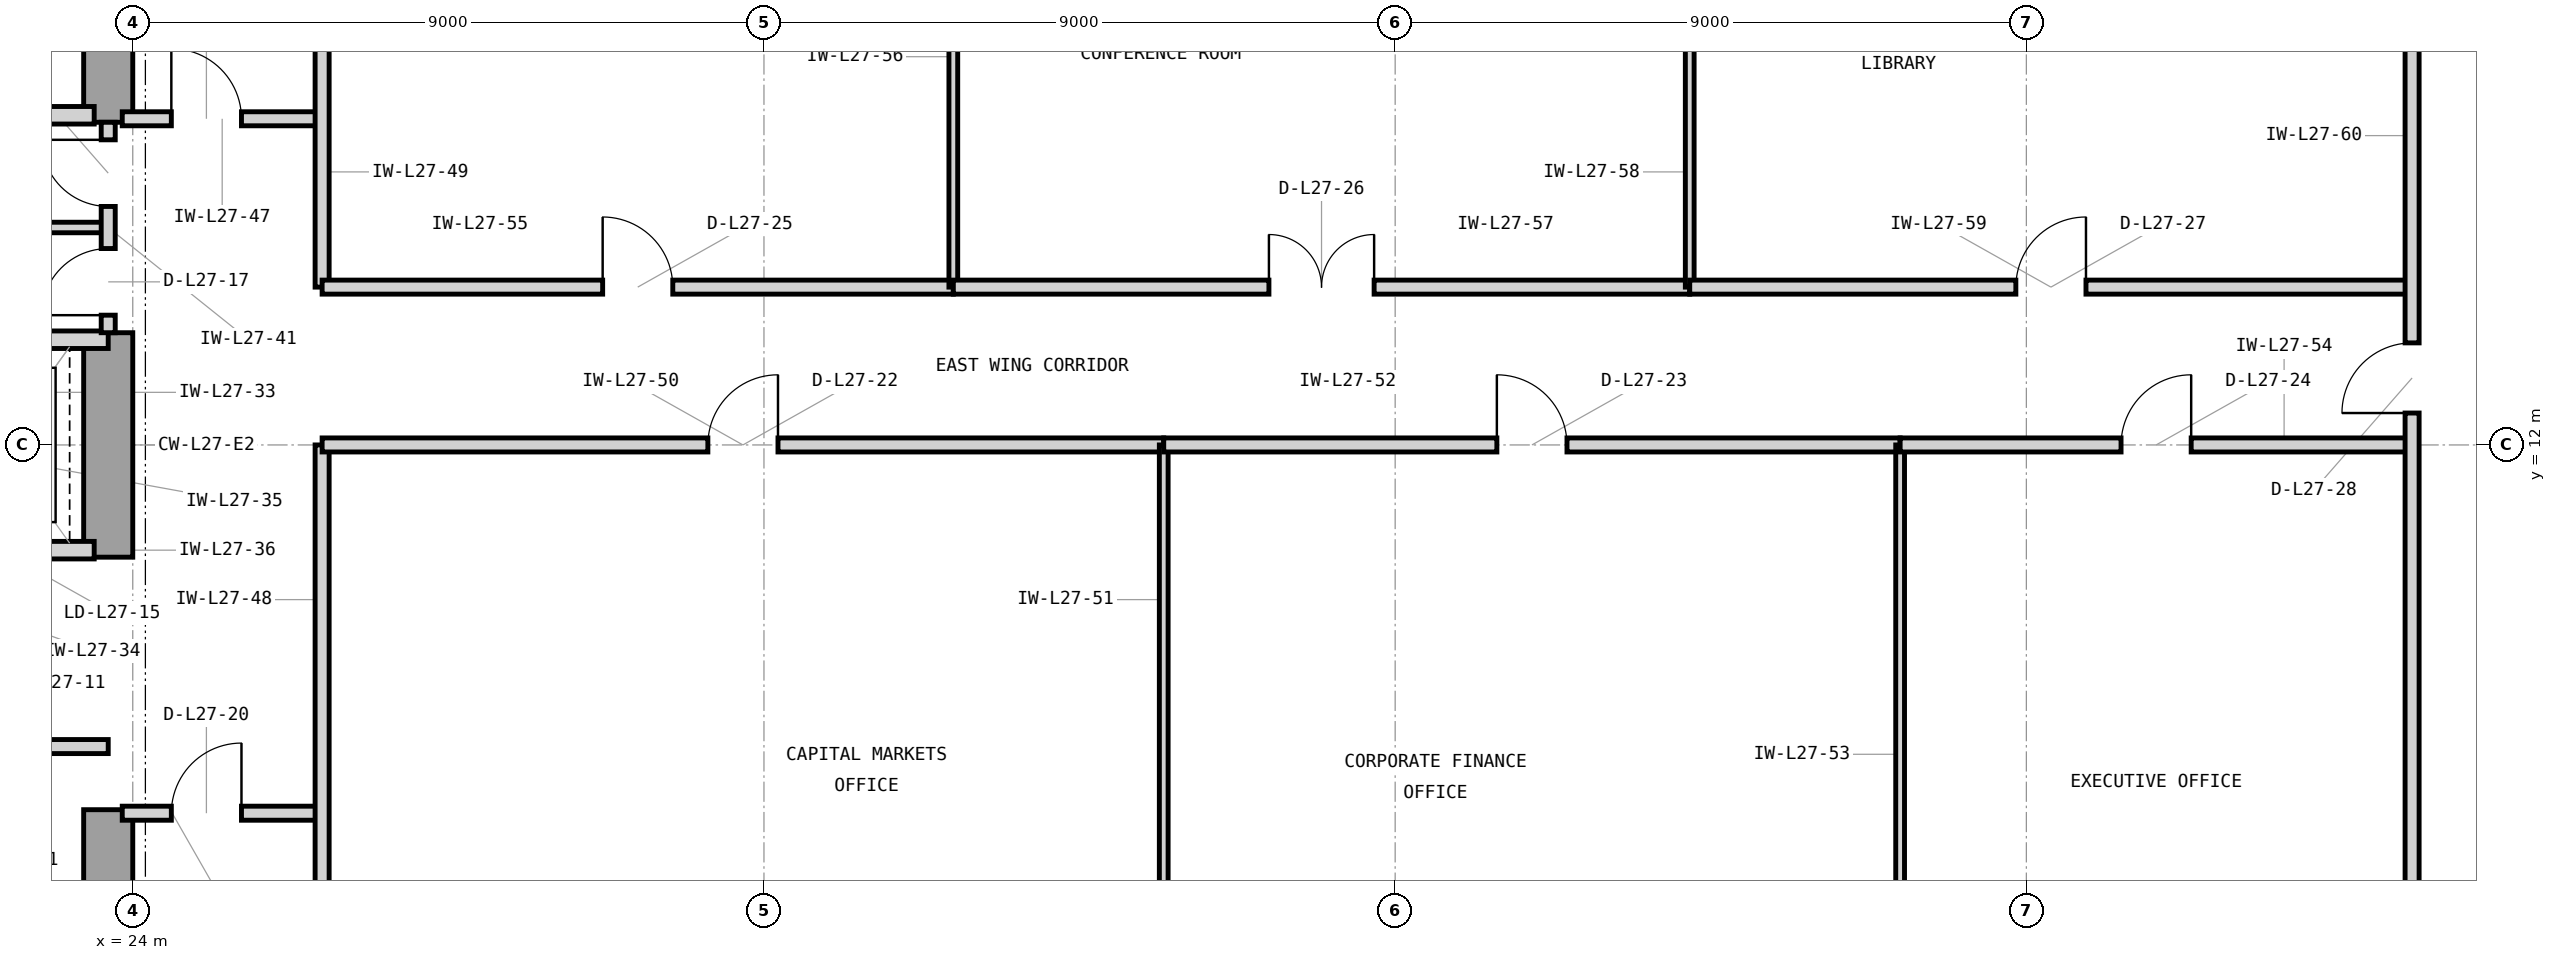
"""IFC4 building model, lengths in metres.
Left out: names, types, materials, properties, quantities, classifications, styles, units other than length and angle.
Written with IfcOpenShell. Run it as: python <this file> out.ifc"""

import sys

from ifc_helpers import new_model, si_unit, direction, frame, frame_2d, origin, place, context, subcontext, project, spatial, rectangle, extrude, element, fill, save


model = new_model("IFC4")
c1 = context("Model", 3, precision=1e-05, world=origin(), true_north=direction((0.0, 1.0)))
c2 = subcontext(c1, "Body", "Model", "MODEL_VIEW")
j1 = project(units=[si_unit("LENGTHUNIT", "METRE"), si_unit("PLANEANGLEUNIT", "RADIAN")], contexts=[c1])
p1 = place(None, origin())
s1 = spatial("IfcSite", under=j1, at=p1, CompositionType="ELEMENT")
p2 = place(p1, origin())
s2 = spatial("IfcBuilding", under=s1, at=p2, CompositionType="ELEMENT")
p3 = place(p2, frame((0.0, 0.0, 116.7)))
s3 = spatial("IfcBuildingStorey", under=s2, at=p3, CompositionType="ELEMENT", Elevation=116.7)
p4 = place(p3, frame((23.65, 3.7, 0.0), z_axis=(0.0, 0.0, 1.0), x_axis=(0.0, 1.0, 0.0)))
e1 = element("IfcWall", 1, at=p4, inside=s3, PredefinedType="SHEAR", context=c2, shape_type="SweptSolid", body=[
    extrude(rectangle(XDim=3.1, YDim=0.7, at=frame_2d((1.55, 0.0))), origin(), (0.0, 0.0, 1.0), 3.9),
])
p5 = place(p3, frame((23.65, 10.4, 0.0), z_axis=(0.0, 0.0, 1.0), x_axis=(0.0, 1.0, 0.0)))
e2 = element("IfcWall", 2, at=p5, inside=s3, PredefinedType="SHEAR", context=c2, shape_type="SweptSolid", body=[
    extrude(rectangle(XDim=3.2, YDim=0.7, at=frame_2d((1.6, 0.0))), origin(), (0.0, 0.0, 1.0), 3.9),
])
p6 = place(p3, frame((23.65, 16.6, 0.0), z_axis=(0.0, 0.0, 1.0), x_axis=(0.0, 1.0, 0.0)))
e3 = element("IfcWall", 3, at=p6, inside=s3, PredefinedType="SHEAR", context=c2, shape_type="SweptSolid", body=[
    extrude(rectangle(XDim=4.05, YDim=0.7, at=frame_2d((2.025, 0.0))), origin(), (0.0, 0.0, 1.0), 3.9),
])
p7 = place(p3, frame((21.05, 16.7, 0.0), z_axis=(0.0, 0.0, 1.0), x_axis=(1.0, 0.0, 0.0)))
e4 = element("IfcWall", 4, at=p7, inside=s3, PredefinedType="PARTITIONING", context=c2, shape_type="SweptSolid", body=[
    extrude(rectangle(XDim=2.4, YDim=0.25, at=frame_2d((1.2, 0.0))), origin(), (0.0, 0.0, 1.0), 3.227),
])
p8 = place(p3, frame((19.15, 7.7, 0.0), z_axis=(0.0, 0.0, 1.0), x_axis=(1.0, 0.0, 0.0)))
e5 = element("IfcWall", 5, at=p8, inside=s3, PredefinedType="PARTITIONING", context=c2, shape_type="SweptSolid", body=[
    extrude(rectangle(XDim=4.5, YDim=0.2, at=frame_2d((2.25, 0.0))), origin(), (0.0, 0.0, 1.0), 3.69),
])
p9 = place(p8, frame((1.75, 0.0, 0.0)))
e6 = element("IfcOpeningElement", 6, at=p9, cuts=e5, PredefinedType="OPENING", context=c2, shape_type="SweptSolid", body=[
    extrude(rectangle(XDim=1.0, YDim=2.15, at=frame_2d((0.5, 1.075))), frame((0.0, 0.11, 0.0), z_axis=(0.0, -1.0, 0.0), x_axis=(1.0, 0.0, 0.0)), (0.0, 0.0, 1.0), 0.22),
])
p10 = place(p3, frame((21.05, 10.5, 0.0), z_axis=(0.0, 0.0, 1.0), x_axis=(1.0, 0.0, 0.0)))
e7 = element("IfcWall", 7, at=p10, inside=s3, PredefinedType="PARTITIONING", context=c2, shape_type="SweptSolid", body=[
    extrude(rectangle(XDim=2.4, YDim=0.25, at=frame_2d((1.2, 0.0))), origin(), (0.0, 0.0, 1.0), 3.227),
])
p11 = place(p10, frame((0.48, 0.0, 0.0)))
e8 = element("IfcOpeningElement", 8, at=p11, cuts=e7, PredefinedType="OPENING", context=c2, shape_type="SweptSolid", body=[
    extrude(rectangle(XDim=1.15, YDim=2.25, at=frame_2d((0.575, 1.125))), frame((0.0, 0.135, 0.0), z_axis=(0.0, -1.0, 0.0), x_axis=(1.0, 0.0, 0.0)), (0.0, 0.0, 1.0), 0.27),
])
p12 = place(p3, frame((14.7, 13.5, 0.0), z_axis=(0.0, 0.0, 1.0), x_axis=(1.0, 0.0, 0.0)))
e9 = element("IfcWall", 9, at=p12, inside=s3, PredefinedType="PARTITIONING", context=c2, shape_type="SweptSolid", body=[
    extrude(rectangle(XDim=8.95, YDim=0.25, at=frame_2d((4.475, 0.0))), origin(), (0.0, 0.0, 1.0), 3.227),
])
p13 = place(p3, frame((19.65, 15.1, 0.0), z_axis=(0.0, 0.0, 1.0), x_axis=(1.0, 0.0, 0.0)))
e10 = element("IfcWall", 10, at=p13, inside=s3, PredefinedType="PARTITIONING", context=c2, shape_type="SweptSolid", body=[
    extrude(rectangle(XDim=4.0, YDim=0.15, at=frame_2d((2.0, 0.0))), origin(), (0.0, 0.0, 1.0), 3.69),
])
p14 = place(p3, frame((23.65, 13.6, 0.0), z_axis=(0.0, 0.0, 1.0), x_axis=(0.0, 1.0, 0.0)))
e11 = element("IfcWall", 11, at=p14, inside=s3, PredefinedType="PARTITIONING", context=c2, shape_type="SweptSolid", body=[
    extrude(rectangle(XDim=3.0, YDim=0.2, at=frame_2d((1.5, 0.0))), origin(), (0.0, 0.0, 1.0), 3.69),
])
p15 = place(p14, frame((0.25, 0.0, 0.0)))
e12 = element("IfcOpeningElement", 12, at=p15, cuts=e11, PredefinedType="OPENING", context=c2, shape_type="SweptSolid", body=[
    extrude(rectangle(XDim=0.95, YDim=2.1, at=frame_2d((0.475, 1.05))), frame((0.0, 0.11, 0.0), z_axis=(0.0, -1.0, 0.0), x_axis=(1.0, 0.0, 0.0)), (0.0, 0.0, 1.0), 0.22),
])
p16 = place(p14, frame((1.8, 0.0, 0.0)))
e13 = element("IfcOpeningElement", 13, at=p16, cuts=e11, PredefinedType="OPENING", context=c2, shape_type="SweptSolid", body=[
    extrude(rectangle(XDim=0.95, YDim=2.1, at=frame_2d((0.475, 1.05))), frame((0.0, 0.11, 0.0), z_axis=(0.0, -1.0, 0.0), x_axis=(1.0, 0.0, 0.0)), (0.0, 0.0, 1.0), 0.22),
])
p17 = place(p3, frame((23.85, 6.75, 0.0), z_axis=(0.0, 0.0, 1.0), x_axis=(1.0, 0.0, 0.0)))
e14 = element("IfcWall", 14, at=p17, inside=s3, PredefinedType="PARTITIONING", context=c2, shape_type="SweptSolid", body=[
    extrude(rectangle(XDim=2.85, YDim=0.2, at=frame_2d((1.425, 0.0))), origin(), (0.0, 0.0, 1.0), 3.69),
])
p18 = place(p17, frame((0.7, 0.0, 0.0)))
e15 = element("IfcOpeningElement", 15, at=p18, cuts=e14, PredefinedType="OPENING", context=c2, shape_type="SweptSolid", body=[
    extrude(rectangle(XDim=1.0, YDim=2.15, at=frame_2d((0.5, 1.075))), frame((0.0, 0.11, 0.0), z_axis=(0.0, -1.0, 0.0), x_axis=(1.0, 0.0, 0.0)), (0.0, 0.0, 1.0), 0.22),
])
p19 = place(p3, frame((23.85, 16.65, 0.0), z_axis=(0.0, 0.0, 1.0), x_axis=(1.0, 0.0, 0.0)))
e16 = element("IfcWall", 16, at=p19, inside=s3, PredefinedType="PARTITIONING", context=c2, shape_type="SweptSolid", body=[
    extrude(rectangle(XDim=2.85, YDim=0.2, at=frame_2d((1.425, 0.0))), origin(), (0.0, 0.0, 1.0), 3.69),
])
p20 = place(p19, frame((0.7, 0.0, 0.0)))
e17 = element("IfcOpeningElement", 17, at=p20, cuts=e16, PredefinedType="OPENING", context=c2, shape_type="SweptSolid", body=[
    extrude(rectangle(XDim=1.0, YDim=2.15, at=frame_2d((0.5, 1.075))), frame((0.0, 0.11, 0.0), z_axis=(0.0, -1.0, 0.0), x_axis=(1.0, 0.0, 0.0)), (0.0, 0.0, 1.0), 0.22),
])
p21 = place(p3, frame((26.7, 3.18, 0.0), z_axis=(0.0, 0.0, 1.0), x_axis=(0.0, 1.0, 0.0)))
e18 = element("IfcWall", 18, at=p21, inside=s3, PredefinedType="PARTITIONING", context=c2, shape_type="SweptSolid", body=[
    extrude(rectangle(XDim=8.82, YDim=0.2, at=frame_2d((4.41, 0.0))), origin(), (0.0, 0.0, 1.0), 3.69),
])
p22 = place(p3, frame((26.7, 14.25, 0.0), z_axis=(0.0, 0.0, 1.0), x_axis=(0.0, 1.0, 0.0)))
e19 = element("IfcWall", 19, at=p22, inside=s3, PredefinedType="PARTITIONING", context=c2, shape_type="SweptSolid", body=[
    extrude(rectangle(XDim=6.57, YDim=0.2, at=frame_2d((3.285, 0.0))), origin(), (0.0, 0.0, 1.0), 3.69),
])
p23 = place(p3, frame((26.7, 12.0, 0.0), z_axis=(0.0, 0.0, 1.0), x_axis=(1.0, 0.0, 0.0)))
e20 = element("IfcWall", 20, at=p23, inside=s3, PredefinedType="PARTITIONING", context=c2, shape_type="SweptSolid", body=[
    extrude(rectangle(XDim=12.0, YDim=0.2, at=frame_2d((6.0, 0.0))), origin(), (0.0, 0.0, 1.0), 3.227),
])
p24 = place(p23, frame((5.5, 0.0, 0.0)))
e21 = element("IfcOpeningElement", 21, at=p24, cuts=e20, PredefinedType="OPENING", context=c2, shape_type="SweptSolid", body=[
    extrude(rectangle(XDim=1.0, YDim=2.15, at=frame_2d((0.5, 1.075))), frame((0.0, 0.11, 0.0), z_axis=(0.0, -1.0, 0.0), x_axis=(1.0, 0.0, 0.0)), (0.0, 0.0, 1.0), 0.22),
])
p25 = place(p3, frame((38.7, 3.18, 0.0), z_axis=(0.0, 0.0, 1.0), x_axis=(0.0, 1.0, 0.0)))
e22 = element("IfcWall", 22, at=p25, inside=s3, PredefinedType="PARTITIONING", context=c2, shape_type="SweptSolid", body=[
    extrude(rectangle(XDim=8.82, YDim=0.125, at=frame_2d((4.41, 0.0))), origin(), (0.0, 0.0, 1.0), 3.69),
])
p26 = place(p3, frame((38.7, 12.0, 0.0), z_axis=(0.0, 0.0, 1.0), x_axis=(1.0, 0.0, 0.0)))
e23 = element("IfcWall", 23, at=p26, inside=s3, PredefinedType="PARTITIONING", context=c2, shape_type="SweptSolid", body=[
    extrude(rectangle(XDim=10.5, YDim=0.2, at=frame_2d((5.25, 0.0))), origin(), (0.0, 0.0, 1.0), 3.227),
])
p27 = place(p26, frame((4.75, 0.0, 0.0)))
e24 = element("IfcOpeningElement", 24, at=p27, cuts=e23, PredefinedType="OPENING", context=c2, shape_type="SweptSolid", body=[
    extrude(rectangle(XDim=1.0, YDim=2.15, at=frame_2d((0.5, 1.075))), frame((0.0, 0.11, 0.0), z_axis=(0.0, -1.0, 0.0), x_axis=(1.0, 0.0, 0.0)), (0.0, 0.0, 1.0), 0.22),
])
p28 = place(p3, frame((49.2, 3.18, 0.0), z_axis=(0.0, 0.0, 1.0), x_axis=(0.0, 1.0, 0.0)))
e25 = element("IfcWall", 25, at=p28, inside=s3, PredefinedType="PARTITIONING", context=c2, shape_type="SweptSolid", body=[
    extrude(rectangle(XDim=8.82, YDim=0.125, at=frame_2d((4.41, 0.0))), origin(), (0.0, 0.0, 1.0), 3.69),
])
p29 = place(p3, frame((49.2, 12.0, 0.0), z_axis=(0.0, 0.0, 1.0), x_axis=(1.0, 0.0, 0.0)))
e26 = element("IfcWall", 26, at=p29, inside=s3, PredefinedType="PARTITIONING", context=c2, shape_type="SweptSolid", body=[
    extrude(rectangle(XDim=7.3, YDim=0.2, at=frame_2d((3.65, 0.0))), origin(), (0.0, 0.0, 1.0), 3.227),
])
p30 = place(p29, frame((3.15, 0.0, 0.0)))
e27 = element("IfcOpeningElement", 27, at=p30, cuts=e26, PredefinedType="OPENING", context=c2, shape_type="SweptSolid", body=[
    extrude(rectangle(XDim=1.0, YDim=2.15, at=frame_2d((0.5, 1.075))), frame((0.0, 0.11, 0.0), z_axis=(0.0, -1.0, 0.0), x_axis=(1.0, 0.0, 0.0)), (0.0, 0.0, 1.0), 0.22),
])
p31 = place(p3, frame((26.7, 14.25, 0.0), z_axis=(0.0, 0.0, 1.0), x_axis=(1.0, 0.0, 0.0)))
e28 = element("IfcWall", 28, at=p31, inside=s3, PredefinedType="PARTITIONING", context=c2, shape_type="SweptSolid", body=[
    extrude(rectangle(XDim=9.0, YDim=0.2, at=frame_2d((4.5, 0.0))), origin(), (0.0, 0.0, 1.0), 3.69),
])
p32 = place(p31, frame((4.0, 0.0, 0.0)))
e29 = element("IfcOpeningElement", 29, at=p32, cuts=e28, PredefinedType="OPENING", context=c2, shape_type="SweptSolid", body=[
    extrude(rectangle(XDim=1.0, YDim=2.15, at=frame_2d((0.5, 1.075))), frame((0.0, 0.11, 0.0), z_axis=(0.0, -1.0, 0.0), x_axis=(1.0, 0.0, 0.0)), (0.0, 0.0, 1.0), 0.22),
])
p33 = place(p3, frame((35.7, 14.25, 0.0), z_axis=(0.0, 0.0, 1.0), x_axis=(0.0, 1.0, 0.0)))
e30 = element("IfcWall", 30, at=p33, inside=s3, PredefinedType="PARTITIONING", context=c2, shape_type="SweptSolid", body=[
    extrude(rectangle(XDim=6.57, YDim=0.125, at=frame_2d((3.285, 0.0))), origin(), (0.0, 0.0, 1.0), 3.69),
])
p34 = place(p3, frame((35.7, 14.25, 0.0), z_axis=(0.0, 0.0, 1.0), x_axis=(1.0, 0.0, 0.0)))
e31 = element("IfcWall", 31, at=p34, inside=s3, PredefinedType="PARTITIONING", context=c2, shape_type="SweptSolid", body=[
    extrude(rectangle(XDim=10.5, YDim=0.2, at=frame_2d((5.25, 0.0))), origin(), (0.0, 0.0, 1.0), 3.69),
])
p35 = place(p34, frame((4.5, 0.0, 0.0)))
e32 = element("IfcOpeningElement", 32, at=p35, cuts=e31, PredefinedType="OPENING", context=c2, shape_type="SweptSolid", body=[
    extrude(rectangle(XDim=1.5, YDim=2.3, at=frame_2d((0.75, 1.15))), frame((0.0, 0.11, 0.0), z_axis=(0.0, -1.0, 0.0), x_axis=(1.0, 0.0, 0.0)), (0.0, 0.0, 1.0), 0.22),
])
p36 = place(p3, frame((46.2, 14.25, 0.0), z_axis=(0.0, 0.0, 1.0), x_axis=(0.0, 1.0, 0.0)))
e33 = element("IfcWall", 33, at=p36, inside=s3, PredefinedType="PARTITIONING", context=c2, shape_type="SweptSolid", body=[
    extrude(rectangle(XDim=6.57, YDim=0.125, at=frame_2d((3.285, 0.0))), origin(), (0.0, 0.0, 1.0), 3.69),
])
p37 = place(p3, frame((46.2, 14.25, 0.0), z_axis=(0.0, 0.0, 1.0), x_axis=(1.0, 0.0, 0.0)))
e34 = element("IfcWall", 34, at=p37, inside=s3, PredefinedType="PARTITIONING", context=c2, shape_type="SweptSolid", body=[
    extrude(rectangle(XDim=10.3, YDim=0.2, at=frame_2d((5.15, 0.0))), origin(), (0.0, 0.0, 1.0), 3.69),
])
p38 = place(p37, frame((4.65, 0.0, 0.0)))
e35 = element("IfcOpeningElement", 35, at=p38, cuts=e34, PredefinedType="OPENING", context=c2, shape_type="SweptSolid", body=[
    extrude(rectangle(XDim=1.0, YDim=2.15, at=frame_2d((0.5, 1.075))), frame((0.0, 0.11, 0.0), z_axis=(0.0, -1.0, 0.0), x_axis=(1.0, 0.0, 0.0)), (0.0, 0.0, 1.0), 0.22),
])
p39 = place(p3, frame((56.5, 3.18, 0.0), z_axis=(0.0, 0.0, 1.0), x_axis=(0.0, 1.0, 0.0)))
e36 = element("IfcWall", 36, at=p39, inside=s3, PredefinedType="PARTITIONING", context=c2, shape_type="SweptSolid", body=[
    extrude(rectangle(XDim=17.64, YDim=0.2, at=frame_2d((8.82, 0.0))), origin(), (0.0, 0.0, 1.0), 3.69),
])
p40 = place(p39, frame((9.275, 0.0, 0.0)))
e37 = element("IfcOpeningElement", 37, at=p40, cuts=e36, PredefinedType="OPENING", context=c2, shape_type="SweptSolid", body=[
    extrude(rectangle(XDim=1.0, YDim=2.15, at=frame_2d((0.5, 1.075))), frame((0.0, 0.11, 0.0), z_axis=(0.0, -1.0, 0.0), x_axis=(1.0, 0.0, 0.0)), (0.0, 0.0, 1.0), 0.22),
])
p41 = place(p15, origin())
e38 = element("IfcDoor", 38, at=p41, inside=s3, OperationType="SINGLE_SWING_LEFT", PredefinedType="DOOR", context=c2, shape_type="SweptSolid", body=[
    extrude(rectangle(XDim=0.95, YDim=2.1, at=frame_2d((0.475, 1.05))), frame((0.0, 0.025, 0.0), z_axis=(0.0, -1.0, 0.0), x_axis=(1.0, 0.0, 0.0)), (0.0, 0.0, 1.0), 0.05),
])
fill(e12, e38)
p42 = place(p16, origin())
e39 = element("IfcDoor", 39, at=p42, inside=s3, OperationType="SINGLE_SWING_RIGHT", PredefinedType="DOOR", context=c2, shape_type="SweptSolid", body=[
    extrude(rectangle(XDim=0.95, YDim=2.1, at=frame_2d((0.475, 1.05))), frame((0.0, 0.025, 0.0), z_axis=(0.0, -1.0, 0.0), x_axis=(1.0, 0.0, 0.0)), (0.0, 0.0, 1.0), 0.05),
])
fill(e13, e39)
p43 = place(p18, origin())
e40 = element("IfcDoor", 40, at=p43, inside=s3, OperationType="SINGLE_SWING_RIGHT", PredefinedType="DOOR", context=c2, shape_type="SweptSolid", body=[
    extrude(rectangle(XDim=1.0, YDim=2.15, at=frame_2d((0.5, 1.075))), frame((0.0, 0.025, 0.0), z_axis=(0.0, -1.0, 0.0), x_axis=(1.0, 0.0, 0.0)), (0.0, 0.0, 1.0), 0.05),
])
fill(e15, e40)
p44 = place(p20, origin())
e41 = element("IfcDoor", 41, at=p44, inside=s3, OperationType="SINGLE_SWING_LEFT", PredefinedType="DOOR", context=c2, shape_type="SweptSolid", body=[
    extrude(rectangle(XDim=1.0, YDim=2.15, at=frame_2d((0.5, 1.075))), frame((0.0, 0.025, 0.0), z_axis=(0.0, -1.0, 0.0), x_axis=(1.0, 0.0, 0.0)), (0.0, 0.0, 1.0), 0.05),
])
fill(e17, e41)
p45 = place(p24, origin())
e42 = element("IfcDoor", 42, at=p45, inside=s3, OperationType="SINGLE_SWING_RIGHT", PredefinedType="DOOR", context=c2, shape_type="SweptSolid", body=[
    extrude(rectangle(XDim=1.0, YDim=2.15, at=frame_2d((0.5, 1.075))), frame((0.0, 0.025, 0.0), z_axis=(0.0, -1.0, 0.0), x_axis=(1.0, 0.0, 0.0)), (0.0, 0.0, 1.0), 0.05),
])
fill(e21, e42)
p46 = place(p27, origin())
e43 = element("IfcDoor", 43, at=p46, inside=s3, OperationType="SINGLE_SWING_LEFT", PredefinedType="DOOR", context=c2, shape_type="SweptSolid", body=[
    extrude(rectangle(XDim=1.0, YDim=2.15, at=frame_2d((0.5, 1.075))), frame((0.0, 0.025, 0.0), z_axis=(0.0, -1.0, 0.0), x_axis=(1.0, 0.0, 0.0)), (0.0, 0.0, 1.0), 0.05),
])
fill(e24, e43)
p47 = place(p30, origin())
e44 = element("IfcDoor", 44, at=p47, inside=s3, OperationType="SINGLE_SWING_RIGHT", PredefinedType="DOOR", context=c2, shape_type="SweptSolid", body=[
    extrude(rectangle(XDim=1.0, YDim=2.15, at=frame_2d((0.5, 1.075))), frame((0.0, 0.025, 0.0), z_axis=(0.0, -1.0, 0.0), x_axis=(1.0, 0.0, 0.0)), (0.0, 0.0, 1.0), 0.05),
])
fill(e27, e44)
p48 = place(p32, origin())
e45 = element("IfcDoor", 45, at=p48, inside=s3, OperationType="SINGLE_SWING_LEFT", PredefinedType="DOOR", context=c2, shape_type="SweptSolid", body=[
    extrude(rectangle(XDim=1.0, YDim=2.15, at=frame_2d((0.5, 1.075))), frame((0.0, 0.025, 0.0), z_axis=(0.0, -1.0, 0.0), x_axis=(1.0, 0.0, 0.0)), (0.0, 0.0, 1.0), 0.05),
])
fill(e29, e45)
p49 = place(p35, origin())
e46 = element("IfcDoor", 46, at=p49, inside=s3, OperationType="DOUBLE_DOOR_SINGLE_SWING", PredefinedType="DOOR", context=c2, shape_type="SweptSolid", body=[
    extrude(rectangle(XDim=1.5, YDim=2.3, at=frame_2d((0.75, 1.15))), frame((0.0, 0.025, 0.0), z_axis=(0.0, -1.0, 0.0), x_axis=(1.0, 0.0, 0.0)), (0.0, 0.0, 1.0), 0.05),
])
fill(e32, e46)
p50 = place(p38, origin())
e47 = element("IfcDoor", 47, at=p50, inside=s3, OperationType="SINGLE_SWING_RIGHT", PredefinedType="DOOR", context=c2, shape_type="SweptSolid", body=[
    extrude(rectangle(XDim=1.0, YDim=2.15, at=frame_2d((0.5, 1.075))), frame((0.0, 0.025, 0.0), z_axis=(0.0, -1.0, 0.0), x_axis=(1.0, 0.0, 0.0)), (0.0, 0.0, 1.0), 0.05),
])
fill(e35, e47)
p51 = place(p40, origin())
e48 = element("IfcDoor", 48, at=p51, inside=s3, OperationType="SINGLE_SWING_LEFT", PredefinedType="DOOR", context=c2, shape_type="SweptSolid", body=[
    extrude(rectangle(XDim=1.0, YDim=2.15, at=frame_2d((0.5, 1.075))), frame((0.0, 0.025, 0.0), z_axis=(0.0, -1.0, 0.0), x_axis=(1.0, 0.0, 0.0)), (0.0, 0.0, 1.0), 0.05),
])
fill(e37, e48)
save(model, sys.argv[1])
